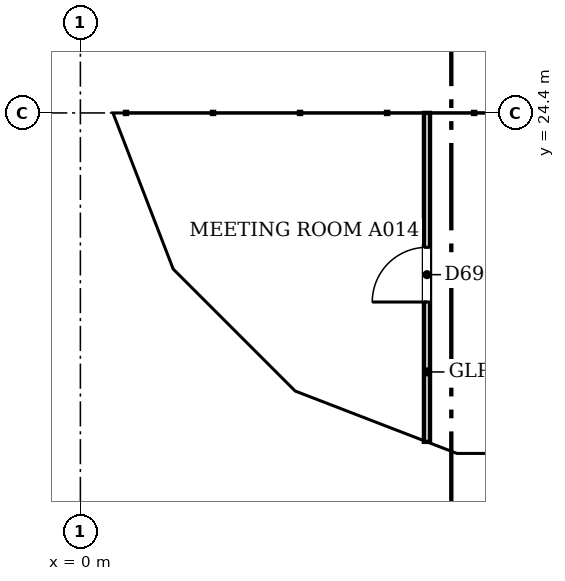
"""IFC4 building model, lengths in metres.
Left out: names, types, materials, properties, quantities, classifications, styles, units other than length and angle.
Written with IfcOpenShell. Run it as: python <this file> out.ifc"""

import sys

from ifc_helpers import new_model, si_unit, direction, frame, frame_2d, origin, place, context, subcontext, project, spatial, polyline, rectangle, outline, extrude, faceted_brep, source, transform, mapped, element, fill, save


model = new_model("IFC4")
c1 = context("Model", 3, precision=1e-05, world=origin(), true_north=direction((0.0, 1.0)))
c2 = subcontext(c1, "Body", "Model", "MODEL_VIEW")
j1 = project(units=[si_unit("LENGTHUNIT", "METRE"), si_unit("PLANEANGLEUNIT", "RADIAN")], contexts=[c1])
p1 = place(None, origin())
s1 = spatial("IfcSite", under=j1, at=p1, CompositionType="ELEMENT")
p2 = place(p1, origin())
s2 = spatial("IfcBuilding", under=s1, at=p2, CompositionType="ELEMENT")
p3 = place(p2, frame((0.0, 0.0, 52.4)))
s3 = spatial("IfcBuildingStorey", under=s2, at=p3, CompositionType="ELEMENT", Elevation=52.4)
m1 = source(origin(), c2, "Body", "Brep", [
    faceted_brep([(3.003, -0.25, 0.0), (3.05, -0.25, 0.06), (3.05, -0.25, 7.54), (3.003, -0.25, 7.6), (0.0, -0.25, 3.8), (0.0, 0.25, 3.8), (2.957, 0.25, 7.541), (2.957, 0.25, 0.059), (3.003, 0.0, 0.0), (3.003, 0.0, 7.6)], [[[0, 1, 2, 3, 4]], [[5, 6, 7]], [[1, 0, 8]], [[9, 3, 2]], [[6, 5, 4, 3, 9]], [[5, 7, 8, 0, 4]], [[1, 8, 7, 6, 9, 2]]]),
])
p4 = place(p3, frame((0.25, 27.45, -3.8), z_axis=(0.0, 0.0, 1.0), x_axis=(0.0, -1.0, 0.0)))
e1 = element("IfcWall", 1, at=p4, inside=s3, PredefinedType="SOLIDWALL", context=c2, shape_type="MappedRepresentation", body=[
    mapped(m1, transform((0.0, 0.0, 0.0), scale=1.0)),
])
m2 = source(origin(), c2, "Body", "SweptSolid", [
    extrude(outline(polyline([(2.803, 6.944), (0.319, 3.8), (2.803, 0.656), (2.803, 6.944)])), frame((0.0, 0.26, 0.0), z_axis=(0.0, -1.0, 0.0), x_axis=(1.0, 0.0, 0.0)), (0.0, 0.0, 1.0), 0.52),
])
p5 = place(p4, origin())
e2 = element("IfcOpeningElement", 2, at=p5, cuts=e1, PredefinedType="OPENING", context=c2, shape_type="MappedRepresentation", body=[
    mapped(m2, transform((0.0, 0.0, 0.0), scale=1.0)),
])
m3 = source(origin(), c2, "Body", "Brep", [
    faceted_brep([(0.047, -0.25, 0.0), (2.997, -0.25, 3.8), (0.047, -0.25, 7.6), (0.0, -0.25, 7.541), (0.0, -0.25, 0.059), (0.093, 0.25, 7.54), (2.944, 0.25, 3.868), (2.944, 0.25, 3.732), (0.093, 0.25, 0.06), (2.997, 0.0, 3.8), (0.047, 0.0, 0.0), (0.047, 0.0, 7.6)], [[[0, 1, 2, 3, 4]], [[5, 6, 7, 8]], [[8, 7, 9, 1, 0, 10]], [[6, 5, 11, 2, 1, 9]], [[3, 2, 11]], [[10, 0, 4]], [[8, 10, 4, 3, 11, 5]], [[9, 7, 6]]]),
])
p6 = place(p3, frame((0.233, 24.49, -3.8), z_axis=(0.0, 0.0, 1.0), x_axis=(0.359901446078, -0.932990326376, 0.0)))
e3 = element("IfcWall", 3, at=p6, inside=s3, PredefinedType="SOLIDWALL", context=c2, shape_type="MappedRepresentation", body=[
    mapped(m3, transform((0.0, 0.0, 0.0), scale=1.0)),
])
m4 = source(origin(), c2, "Body", "SweptSolid", [
    extrude(outline(polyline([(0.247, 0.665), (2.681, 3.8), (0.247, 6.935), (0.247, 0.665)])), frame((0.0, 0.26, 0.0), z_axis=(0.0, -1.0, 0.0), x_axis=(1.0, 0.0, 0.0)), (0.0, 0.0, 1.0), 0.52),
])
p7 = place(p6, origin())
e4 = element("IfcOpeningElement", 4, at=p7, cuts=e3, PredefinedType="OPENING", context=c2, shape_type="MappedRepresentation", body=[
    mapped(m4, transform((0.0, 0.0, 0.0), scale=1.0)),
])
m5 = source(origin(), c2, "Body", "Brep", [
    faceted_brep([(2.944, -0.25, 0.0), (2.997, -0.25, 0.068), (2.997, -0.25, 7.532), (2.944, -0.25, 7.6), (0.0, -0.25, 3.8), (0.053, 0.25, 3.868), (2.891, 0.25, 7.532), (2.891, 0.25, 0.068), (0.053, 0.25, 3.731), (2.944, 0.0, 0.0), (2.944, 0.0, 7.6), (0.0, 0.0, 3.8)], [[[0, 1, 2, 3, 4]], [[5, 6, 7, 8]], [[1, 0, 9]], [[10, 3, 2]], [[6, 5, 11, 4, 3, 10]], [[8, 7, 9, 0, 4, 11]], [[8, 11, 5]], [[1, 9, 7, 6, 10, 2]]]),
])
p8 = place(p3, frame((1.312, 21.694, -3.8), z_axis=(0.0, 0.0, 1.0), x_axis=(0.707066050402, -0.707147509625, 0.0)))
e5 = element("IfcWall", 5, at=p8, inside=s3, PredefinedType="SOLIDWALL", context=c2, shape_type="MappedRepresentation", body=[
    mapped(m5, transform((0.0, 0.0, 0.0), scale=1.0)),
])
m6 = source(origin(), c2, "Body", "SweptSolid", [
    extrude(outline(polyline([(2.744, 6.934), (0.316, 3.8), (2.744, 0.666), (2.744, 6.934)])), frame((0.0, 0.26, 0.0), z_axis=(0.0, -1.0, 0.0), x_axis=(1.0, 0.0, 0.0)), (0.0, 0.0, 1.0), 0.52),
])
p9 = place(p8, origin())
e6 = element("IfcOpeningElement", 6, at=p9, cuts=e5, PredefinedType="OPENING", context=c2, shape_type="MappedRepresentation", body=[
    mapped(m6, transform((0.0, 0.0, 0.0), scale=1.0)),
])
m7 = source(origin(), c2, "Body", "Brep", [
    faceted_brep([(0.053, -0.25, 0.0), (3.003, -0.25, 3.8), (0.053, -0.25, 7.6), (0.0, -0.25, 7.531), (0.0, -0.25, 0.068), (0.106, 0.25, 7.532), (2.957, 0.25, 3.86), (2.957, 0.25, 3.74), (0.106, 0.25, 0.068), (3.003, 0.0, 3.8), (0.053, 0.0, 0.0), (0.053, 0.0, 7.6)], [[[0, 1, 2, 3, 4]], [[5, 6, 7, 8]], [[8, 7, 9, 1, 0, 10]], [[6, 5, 11, 2, 1, 9]], [[3, 2, 11]], [[10, 0, 4]], [[8, 10, 4, 3, 11, 5]], [[9, 7, 6]]]),
])
p10 = place(p3, frame((3.344, 19.631, -3.8), z_axis=(0.0, 0.0, 1.0), x_axis=(0.933007896601, -0.359855894603, 0.0)))
e7 = element("IfcWall", 7, at=p10, inside=s3, PredefinedType="SOLIDWALL", context=c2, shape_type="MappedRepresentation", body=[
    mapped(m7, transform((0.0, 0.0, 0.0), scale=1.0)),
])
m8 = source(origin(), c2, "Body", "SweptSolid", [
    extrude(outline(polyline([(0.253, 0.665), (2.687, 3.8), (0.253, 6.935), (0.253, 0.665)])), frame((0.0, 0.26, 0.0), z_axis=(0.0, -1.0, 0.0), x_axis=(1.0, 0.0, 0.0)), (0.0, 0.0, 1.0), 0.52),
])
p11 = place(p10, origin())
e8 = element("IfcOpeningElement", 8, at=p11, cuts=e7, PredefinedType="OPENING", context=c2, shape_type="MappedRepresentation", body=[
    mapped(m8, transform((0.0, 0.0, 0.0), scale=1.0)),
])
m9 = source(origin(), c2, "Body", "Brep", [
    faceted_brep([(3.003, -0.25, 0.0), (6.053, -0.25, 3.8), (3.003, -0.25, 7.6), (0.0, -0.25, 3.8), (0.047, 0.25, 3.859), (3.003, 0.25, 7.6), (6.053, 0.25, 3.8), (3.003, 0.25, 0.0), (0.047, 0.25, 3.741), (0.0, 0.0, 3.8)], [[[0, 1, 2, 3]], [[4, 5, 6, 7, 8]], [[7, 6, 1, 0]], [[6, 5, 2, 1]], [[5, 4, 9, 3, 2]], [[8, 7, 0, 3, 9]], [[8, 9, 4]]]),
])
p12 = place(p3, frame((6.146, 18.55, -3.8), z_axis=(0.0, 0.0, 1.0), x_axis=(1.0, 0.0, 0.0)))
e9 = element("IfcWall", 9, at=p12, inside=s3, PredefinedType="SOLIDWALL", context=c2, shape_type="MappedRepresentation", body=[
    mapped(m9, transform((0.0, 0.0, 0.0), scale=1.0)),
])
m10 = source(origin(), c2, "Body", "SweptSolid", [
    extrude(outline(polyline([(3.005, 0.401), (5.733, 3.8), (3.005, 7.199), (0.319, 3.8), (3.005, 0.401)])), frame((0.0, 0.26, 0.0), z_axis=(0.0, -1.0, 0.0), x_axis=(1.0, 0.0, 0.0)), (0.0, 0.0, 1.0), 0.52),
])
p13 = place(p12, origin())
e10 = element("IfcOpeningElement", 10, at=p13, cuts=e9, PredefinedType="OPENING", context=c2, shape_type="MappedRepresentation", body=[
    mapped(m10, transform((0.0, 0.0, 0.0), scale=1.0)),
])
p14 = place(p2, frame((0.0, 0.0, 56.2)))
s4 = spatial("IfcBuildingStorey", under=s2, at=p14, CompositionType="ELEMENT", Elevation=56.2)
m11 = source(origin(), c2, "Body", "Brep", [
    faceted_brep([(3.05, -0.25, 0.0), (6.053, -0.25, 3.8), (3.05, -0.25, 7.6), (0.0, -0.25, 3.8), (0.0, 0.25, 3.8), (3.05, 0.25, 7.6), (6.007, 0.25, 3.859), (6.007, 0.25, 3.741), (3.05, 0.25, 0.0), (6.053, 0.0, 3.8)], [[[0, 1, 2, 3]], [[4, 5, 6, 7, 8]], [[8, 7, 9, 1, 0]], [[6, 5, 2, 1, 9]], [[5, 4, 3, 2]], [[4, 8, 0, 3]], [[9, 7, 6]]]),
])
p15 = place(p14, frame((0.25, 30.5, -3.8), z_axis=(0.0, 0.0, 1.0), x_axis=(0.0, -1.0, 0.0)))
e11 = element("IfcWall", 11, at=p15, inside=s4, PredefinedType="SOLIDWALL", context=c2, shape_type="MappedRepresentation", body=[
    mapped(m11, transform((0.0, 0.0, 0.0), scale=1.0)),
])
m12 = source(origin(), c2, "Body", "SweptSolid", [
    extrude(outline(polyline([(3.049, 0.401), (5.735, 3.8), (3.049, 7.199), (0.321, 3.8), (3.049, 0.401)])), frame((0.0, 0.26, 0.0), z_axis=(0.0, -1.0, 0.0), x_axis=(1.0, 0.0, 0.0)), (0.0, 0.0, 1.0), 0.52),
])
p16 = place(p15, origin())
e12 = element("IfcOpeningElement", 12, at=p16, cuts=e11, PredefinedType="OPENING", context=c2, shape_type="MappedRepresentation", body=[
    mapped(m12, transform((0.0, 0.0, 0.0), scale=1.0)),
])
m13 = source(origin(), c2, "Body", "Brep", [
    faceted_brep([(2.95, -0.25, 0.0), (3.003, -0.25, 0.068), (3.003, -0.25, 7.532), (2.95, -0.25, 7.6), (0.0, -0.25, 3.8), (0.047, 0.25, 3.86), (2.898, 0.25, 7.532), (2.898, 0.25, 0.068), (0.047, 0.25, 3.74), (2.95, 0.0, 0.0), (2.95, 0.0, 7.6), (0.0, 0.0, 3.8)], [[[0, 1, 2, 3, 4]], [[5, 6, 7, 8]], [[1, 0, 9]], [[10, 3, 2]], [[6, 5, 11, 4, 3, 10]], [[8, 7, 9, 0, 4, 11]], [[8, 11, 5]], [[1, 9, 7, 6, 10, 2]]]),
])
p17 = place(p14, frame((0.25, 24.447, -3.8), z_axis=(0.0, 0.0, 1.0), x_axis=(0.35992665181, -0.932980602862, 0.0)))
e13 = element("IfcWall", 13, at=p17, inside=s4, PredefinedType="SOLIDWALL", context=c2, shape_type="MappedRepresentation", body=[
    mapped(m13, transform((0.0, 0.0, 0.0), scale=1.0)),
])
m14 = source(origin(), c2, "Body", "SweptSolid", [
    extrude(outline(polyline([(2.75, 6.935), (0.316, 3.8), (2.75, 0.665), (2.75, 6.935)])), frame((0.0, 0.26, 0.0), z_axis=(0.0, -1.0, 0.0), x_axis=(1.0, 0.0, 0.0)), (0.0, 0.0, 1.0), 0.52),
])
p18 = place(p17, origin())
e14 = element("IfcOpeningElement", 14, at=p18, cuts=e13, PredefinedType="OPENING", context=c2, shape_type="MappedRepresentation", body=[
    mapped(m14, transform((0.0, 0.0, 0.0), scale=1.0)),
])
m15 = source(origin(), c2, "Body", "Brep", [
    faceted_brep([(0.053, -0.25, 0.0), (2.997, -0.25, 3.8), (0.053, -0.25, 7.6), (0.0, -0.25, 7.532), (0.0, -0.25, 0.068), (0.106, 0.25, 7.532), (2.944, 0.25, 3.868), (2.944, 0.25, 3.732), (0.106, 0.25, 0.068), (2.997, 0.0, 3.8), (0.053, 0.0, 0.0), (0.053, 0.0, 7.6)], [[[0, 1, 2, 3, 4]], [[5, 6, 7, 8]], [[8, 7, 9, 1, 0, 10]], [[6, 5, 11, 2, 1, 9]], [[3, 2, 11]], [[10, 0, 4]], [[8, 10, 4, 3, 11, 5]], [[9, 7, 6]]]),
])
p19 = place(p14, frame((1.274, 21.731, -3.8), z_axis=(0.0, 0.0, 1.0), x_axis=(0.707147509625, -0.707066050402, 0.0)))
e15 = element("IfcWall", 15, at=p19, inside=s4, PredefinedType="SOLIDWALL", context=c2, shape_type="MappedRepresentation", body=[
    mapped(m15, transform((0.0, 0.0, 0.0), scale=1.0)),
])
m16 = source(origin(), c2, "Body", "SweptSolid", [
    extrude(outline(polyline([(0.253, 0.667), (2.681, 3.8), (0.253, 6.934), (0.253, 0.667)])), frame((0.0, 0.26, 0.0), z_axis=(0.0, -1.0, 0.0), x_axis=(1.0, 0.0, 0.0)), (0.0, 0.0, 1.0), 0.52),
])
p20 = place(p19, origin())
e16 = element("IfcOpeningElement", 16, at=p20, cuts=e15, PredefinedType="OPENING", context=c2, shape_type="MappedRepresentation", body=[
    mapped(m16, transform((0.0, 0.0, 0.0), scale=1.0)),
])
m17 = source(origin(), c2, "Body", "Brep", [
    faceted_brep([(2.95, -0.25, 0.0), (2.997, -0.25, 0.059), (2.997, -0.25, 7.541), (2.95, -0.25, 7.6), (0.0, -0.25, 3.8), (0.053, 0.25, 3.868), (2.904, 0.25, 7.54), (2.904, 0.25, 0.06), (0.053, 0.25, 3.732), (2.95, 0.0, 0.0), (2.95, 0.0, 7.6), (0.0, 0.0, 3.8)], [[[0, 1, 2, 3, 4]], [[5, 6, 7, 8]], [[1, 0, 9]], [[10, 3, 2]], [[6, 5, 11, 4, 3, 10]], [[8, 7, 9, 0, 4, 11]], [[8, 11, 5]], [[1, 9, 7, 6, 10, 2]]]),
])
p21 = place(p14, frame((3.394, 19.612, -3.8), z_axis=(0.0, 0.0, 1.0), x_axis=(0.932990326376, -0.359901446078, 0.0)))
e17 = element("IfcWall", 17, at=p21, inside=s4, PredefinedType="SOLIDWALL", context=c2, shape_type="MappedRepresentation", body=[
    mapped(m17, transform((0.0, 0.0, 0.0), scale=1.0)),
])
p22 = place(p21, origin())
e18 = element("IfcOpeningElement", 18, at=p22, cuts=e17, PredefinedType="OPENING", context=c2, shape_type="MappedRepresentation", body=[
    mapped(m14, transform((0.0, 0.0, 0.0), scale=1.0)),
])
m18 = source(origin(), c2, "Body", "Brep", [
    faceted_brep([(0.047, -0.25, 0.0), (3.05, -0.25, 3.8), (0.047, -0.25, 7.6), (0.0, -0.25, 7.54), (0.0, -0.25, 0.06), (0.093, 0.25, 7.541), (3.05, 0.25, 3.8), (0.093, 0.25, 0.059), (0.047, 0.0, 0.0), (0.047, 0.0, 7.6)], [[[0, 1, 2, 3, 4]], [[5, 6, 7]], [[7, 6, 1, 0, 8]], [[6, 5, 9, 2, 1]], [[3, 2, 9]], [[8, 0, 4]], [[7, 8, 4, 3, 9, 5]]]),
])
p23 = place(p14, frame((6.1, 18.55, -3.8), z_axis=(0.0, 0.0, 1.0), x_axis=(1.0, 0.0, 0.0)))
e19 = element("IfcWall", 19, at=p23, inside=s4, PredefinedType="SOLIDWALL", context=c2, shape_type="MappedRepresentation", body=[
    mapped(m18, transform((0.0, 0.0, 0.0), scale=1.0)),
])
m19 = source(origin(), c2, "Body", "SweptSolid", [
    extrude(outline(polyline([(0.247, 0.656), (2.731, 3.8), (0.247, 6.944), (0.247, 0.656)])), frame((0.0, 0.26, 0.0), z_axis=(0.0, -1.0, 0.0), x_axis=(1.0, 0.0, 0.0)), (0.0, 0.0, 1.0), 0.52),
])
p24 = place(p23, origin())
e20 = element("IfcOpeningElement", 20, at=p24, cuts=e19, PredefinedType="OPENING", context=c2, shape_type="MappedRepresentation", body=[
    mapped(m19, transform((0.0, 0.0, 0.0), scale=1.0)),
])
p25 = place(p3, frame((5.7, 18.99, 0.0), z_axis=(0.0, 0.0, 1.0), x_axis=(0.0, 1.0, 0.0)))
e21 = element("IfcWall", 21, at=p25, inside=s3, PredefinedType="PARTITIONING", context=c2, shape_type="SweptSolid", body=[
    extrude(rectangle(XDim=5.41, YDim=0.1, at=frame_2d((2.705, 0.0))), origin(), (0.0, 0.0, 1.0), 3.067),
])
m20 = source(origin(), c2, "Body", "SweptSolid", [
    extrude(rectangle(XDim=0.9, YDim=2.1, at=frame_2d((0.45, 1.05))), frame((0.0, 0.06, 0.0), z_axis=(0.0, -1.0, 0.0), x_axis=(1.0, 0.0, 0.0)), (0.0, 0.0, 1.0), 0.12),
])
p26 = place(p25, frame((2.3, 0.0, 0.0)))
e22 = element("IfcOpeningElement", 22, at=p26, cuts=e21, PredefinedType="OPENING", context=c2, shape_type="MappedRepresentation", body=[
    mapped(m20, transform((0.0, 0.0, 0.0), scale=1.0)),
])
m21 = source(origin(), c2, "Body", "SweptSolid", [
    extrude(rectangle(XDim=0.9, YDim=2.1, at=frame_2d((0.45, 1.05))), frame((0.0, 0.025, 0.0), z_axis=(0.0, -1.0, 0.0), x_axis=(1.0, 0.0, 0.0)), (0.0, 0.0, 1.0), 0.05),
])
p27 = place(p26, origin())
e23 = element("IfcDoor", 23, at=p27, inside=s3, OperationType="SINGLE_SWING_LEFT", PredefinedType="DOOR", context=c2, shape_type="MappedRepresentation", body=[
    mapped(m21, transform((0.0, 0.0, 0.0), scale=1.0)),
])
fill(e22, e23)
save(model, sys.argv[1])
